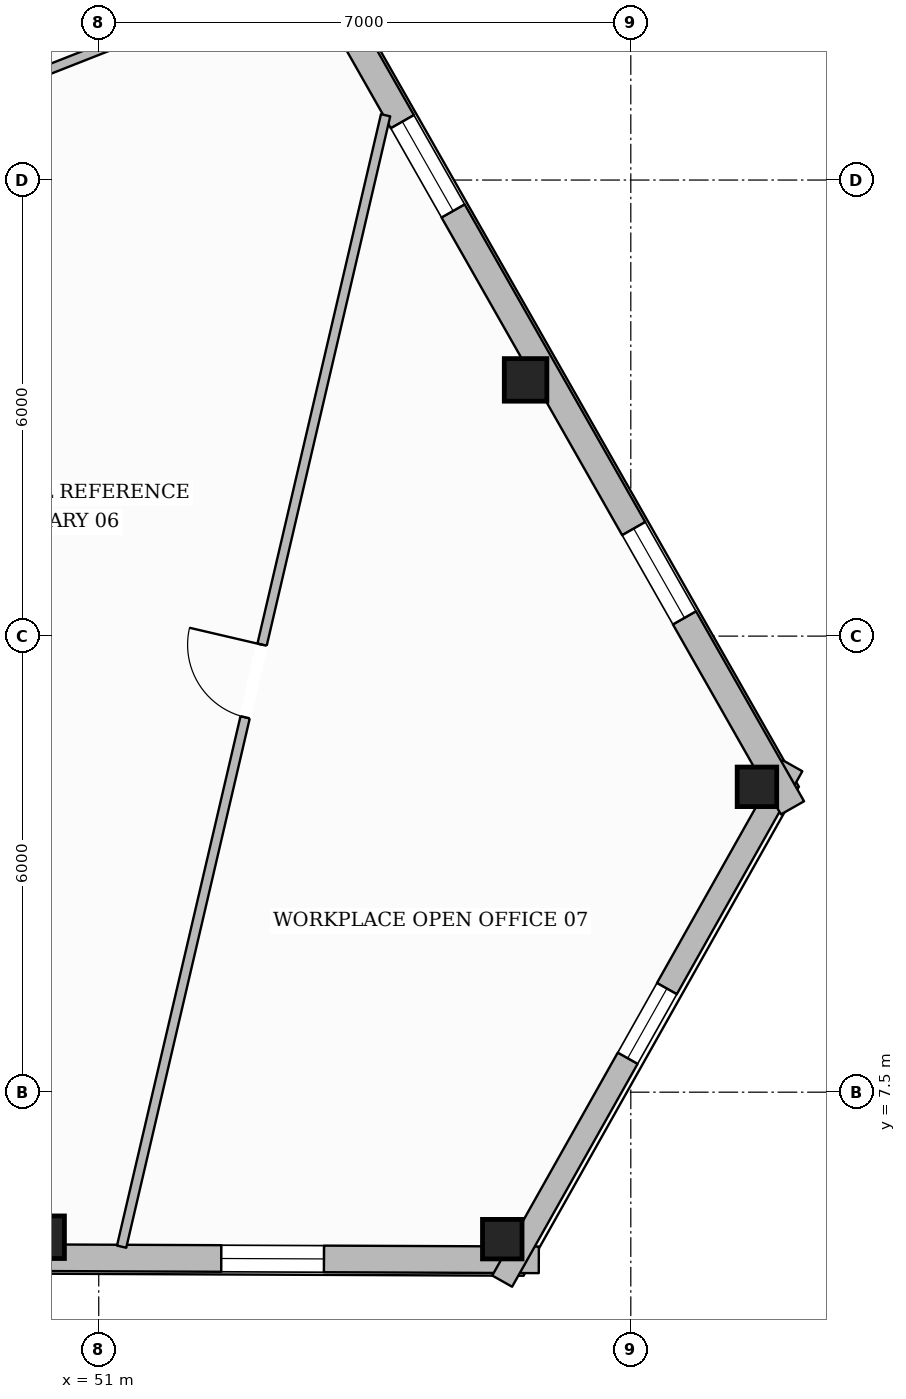
"""IFC4 building model, lengths in metres.
Left out: names, types, materials, properties, quantities, classifications, styles, units other than length and angle.
Written with IfcOpenShell. Run it as: python <this file> out.ifc"""

import sys

from ifc_helpers import new_model, si_unit, direction, frame, frame_2d, origin, origin_2d, place, context, subcontext, project, spatial, rectangle, hollow_rectangle, extrude, element, fill, save


model = new_model("IFC4")
c1 = context("Model", 3, precision=1e-05, world=origin(), true_north=direction((0.0, 1.0)))
c2 = subcontext(c1, "Body", "Model", "MODEL_VIEW")
j1 = project(units=[si_unit("LENGTHUNIT", "METRE"), si_unit("PLANEANGLEUNIT", "RADIAN")], contexts=[c1])
p1 = place(None, origin())
s1 = spatial("IfcSite", under=j1, at=p1, CompositionType="ELEMENT")
p2 = place(p1, origin())
s2 = spatial("IfcBuilding", under=s1, at=p2, CompositionType="ELEMENT")
p3 = place(p2, frame((0.0, 0.0, 239.5)))
s3 = spatial("IfcBuildingStorey", under=s2, at=p3, CompositionType="ELEMENT", Elevation=239.5)
p4 = place(p3, frame((50.269, 5.592, 0.0), z_axis=(0.0, 0.0, 1.0), x_axis=(1.0, 0.0, 0.0)))
e1 = element("IfcColumn", 1, at=p4, inside=s3, PredefinedType="COLUMN", context=c2, shape_type="SweptSolid", body=[
    extrude(hollow_rectangle(XDim=0.56, YDim=0.56, WallThickness=0.025, at=origin_2d()), origin(), (0.0, 0.0, 1.0), 3.61),
])
for number, where, z_axis, x_axis in (
    (2, (56.309, 5.566, 0.0), (0.0, 0.0, 1.0), (1.0, 0.0, 0.0)),
    (3, (59.659, 11.517, 0.0), (0.0, 0.0, 1.0), (1.0, 0.0, 0.0)),
):
    element("IfcColumn", number, at=place(p3, frame(where, z_axis=z_axis, x_axis=x_axis)), inside=s3, PredefinedType="COLUMN", context=c2, shape_type="SweptSolid", body=[
        extrude(hollow_rectangle(XDim=0.52, YDim=0.52, WallThickness=0.024, at=origin_2d()), origin(), (0.0, 0.0, 1.0), 3.61),
    ])
p5 = place(p3, frame((56.615, 16.871, 0.0), z_axis=(0.0, 0.0, 1.0), x_axis=(1.0, 0.0, 0.0)))
e4 = element("IfcColumn", 4, at=p5, inside=s3, PredefinedType="COLUMN", context=c2, shape_type="SweptSolid", body=[
    extrude(hollow_rectangle(XDim=0.56, YDim=0.56, WallThickness=0.025, at=origin_2d()), origin(), (0.0, 0.0, 1.0), 3.61),
])
p6 = place(p3, frame((56.79, 5.294, 0.0), z_axis=(0.0, 0.0, 1.0), x_axis=(-0.999991124913, 0.004213086292, 0.0)))
e5 = element("IfcWall", 5, at=p6, inside=s3, PredefinedType="STANDARD", context=c2, shape_type="SweptSolid", body=[
    extrude(rectangle(XDim=37.203, YDim=0.35, at=frame_2d((18.601, 0.0))), origin(), (0.0, 0.0, 1.0), 3.196),
])
p7 = place(p6, frame((27.302, 0.0, 0.0)))
e6 = element("IfcOpeningElement", 6, at=p7, cuts=e5, PredefinedType="OPENING", context=c2, shape_type="SweptSolid", body=[
    extrude(rectangle(XDim=1.0, YDim=2.2, at=frame_2d((0.5, 1.1))), frame((0.0, 0.185, 0.0), z_axis=(0.0, -1.0, 0.0), x_axis=(1.0, 0.0, 0.0)), (0.0, 0.0, 1.0), 0.37),
])
p8 = place(p6, frame((33.03, 0.0, 0.65)))
e7 = element("IfcOpeningElement", 7, at=p8, cuts=e5, PredefinedType="OPENING", context=c2, shape_type="SweptSolid", body=[
    extrude(rectangle(XDim=1.35, YDim=1.75, at=frame_2d((0.675, 0.875))), frame((0.0, 0.185, 0.0), z_axis=(0.0, -1.0, 0.0), x_axis=(1.0, 0.0, 0.0)), (0.0, 0.0, 1.0), 0.37),
])
p9 = place(p6, frame((20.948, 0.0, 0.65)))
e8 = element("IfcOpeningElement", 8, at=p9, cuts=e5, PredefinedType="OPENING", context=c2, shape_type="SweptSolid", body=[
    extrude(rectangle(XDim=1.35, YDim=1.75, at=frame_2d((0.675, 0.875))), frame((0.0, 0.185, 0.0), z_axis=(0.0, -1.0, 0.0), x_axis=(1.0, 0.0, 0.0)), (0.0, 0.0, 1.0), 0.37),
])
p10 = place(p6, frame((8.868, 0.0, 0.65)))
e9 = element("IfcOpeningElement", 9, at=p10, cuts=e5, PredefinedType="OPENING", context=c2, shape_type="SweptSolid", body=[
    extrude(rectangle(XDim=1.35, YDim=1.75, at=frame_2d((0.675, 0.875))), frame((0.0, 0.185, 0.0), z_axis=(0.0, -1.0, 0.0), x_axis=(1.0, 0.0, 0.0)), (0.0, 0.0, 1.0), 0.37),
])
p11 = place(p6, frame((2.827, 0.0, 0.65)))
e10 = element("IfcOpeningElement", 10, at=p11, cuts=e5, PredefinedType="OPENING", context=c2, shape_type="SweptSolid", body=[
    extrude(rectangle(XDim=1.35, YDim=1.75, at=frame_2d((0.675, 0.875))), frame((0.0, 0.185, 0.0), z_axis=(0.0, -1.0, 0.0), x_axis=(1.0, 0.0, 0.0)), (0.0, 0.0, 1.0), 0.37),
])
p12 = place(p3, frame((60.126, 11.796, 0.0), z_axis=(0.0, 0.0, 1.0), x_axis=(-0.490626070129, -0.87137021943, 0.0)))
e11 = element("IfcWall", 11, at=p12, inside=s3, PredefinedType="STANDARD", context=c2, shape_type="SweptSolid", body=[
    extrude(rectangle(XDim=7.783, YDim=0.3, at=frame_2d((3.892, 0.0))), origin(), (0.0, 0.0, 1.0), 3.196),
])
p13 = place(p12, frame((3.366, 0.0, 0.65)))
e12 = element("IfcOpeningElement", 12, at=p13, cuts=e11, PredefinedType="OPENING", context=c2, shape_type="SweptSolid", body=[
    extrude(rectangle(XDim=1.05, YDim=1.7, at=frame_2d((0.525, 0.85))), frame((0.0, 0.16, 0.0), z_axis=(0.0, -1.0, 0.0), x_axis=(1.0, 0.0, 0.0)), (0.0, 0.0, 1.0), 0.32),
])
p14 = place(p3, frame((41.394, 44.187, 0.0), z_axis=(0.0, 0.0, 1.0), x_axis=(0.494287620829, -0.869298422807, 0.0)))
e13 = element("IfcWall", 13, at=p14, inside=s3, PredefinedType="STANDARD", context=c2, shape_type="SweptSolid", body=[
    extrude(rectangle(XDim=37.899, YDim=0.35, at=frame_2d((18.95, 0.0))), origin(), (0.0, 0.0, 1.0), 3.196),
])
p15 = place(p14, frame((33.674, 0.0, 0.65)))
e14 = element("IfcOpeningElement", 14, at=p15, cuts=e13, PredefinedType="OPENING", context=c2, shape_type="SweptSolid", body=[
    extrude(rectangle(XDim=1.35, YDim=1.75, at=frame_2d((0.675, 0.875))), frame((0.0, 0.185, 0.0), z_axis=(0.0, -1.0, 0.0), x_axis=(1.0, 0.0, 0.0)), (0.0, 0.0, 1.0), 0.37),
])
p16 = place(p14, frame((27.515, 0.0, 0.65)))
e15 = element("IfcOpeningElement", 15, at=p16, cuts=e13, PredefinedType="OPENING", context=c2, shape_type="SweptSolid", body=[
    extrude(rectangle(XDim=1.35, YDim=1.75, at=frame_2d((0.675, 0.875))), frame((0.0, 0.185, 0.0), z_axis=(0.0, -1.0, 0.0), x_axis=(1.0, 0.0, 0.0)), (0.0, 0.0, 1.0), 0.37),
])
p17 = place(p14, frame((21.357, 0.0, 0.65)))
e16 = element("IfcOpeningElement", 16, at=p17, cuts=e13, PredefinedType="OPENING", context=c2, shape_type="SweptSolid", body=[
    extrude(rectangle(XDim=1.35, YDim=1.75, at=frame_2d((0.675, 0.875))), frame((0.0, 0.185, 0.0), z_axis=(0.0, -1.0, 0.0), x_axis=(1.0, 0.0, 0.0)), (0.0, 0.0, 1.0), 0.37),
])
p18 = place(p14, frame((9.04, 0.0, 0.65)))
e17 = element("IfcOpeningElement", 17, at=p18, cuts=e13, PredefinedType="OPENING", context=c2, shape_type="SweptSolid", body=[
    extrude(rectangle(XDim=1.35, YDim=1.75, at=frame_2d((0.675, 0.875))), frame((0.0, 0.185, 0.0), z_axis=(0.0, -1.0, 0.0), x_axis=(1.0, 0.0, 0.0)), (0.0, 0.0, 1.0), 0.37),
])
p19 = place(p14, frame((2.882, 0.0, 0.65)))
e18 = element("IfcOpeningElement", 18, at=p19, cuts=e13, PredefinedType="OPENING", context=c2, shape_type="SweptSolid", body=[
    extrude(rectangle(XDim=1.35, YDim=1.75, at=frame_2d((0.675, 0.875))), frame((0.0, 0.185, 0.0), z_axis=(0.0, -1.0, 0.0), x_axis=(1.0, 0.0, 0.0)), (0.0, 0.0, 1.0), 0.37),
])
p20 = place(p3, frame((49.99, 20.816, 0.0), z_axis=(0.0, 0.0, 1.0), x_axis=(0.930607179135, 0.366019505139, 0.0)))
e19 = element("IfcWall", 19, at=p20, inside=s3, PredefinedType="PARTITIONING", context=c2, shape_type="SweptSolid", body=[
    extrude(rectangle(XDim=3.539, YDim=0.125, at=frame_2d((1.769, 0.0))), origin(), (0.0, 0.0, 1.0), 3.61),
])
p21 = place(p3, frame((51.301, 5.468, 0.0), z_axis=(0.0, 0.0, 1.0), x_axis=(0.22721648706, 0.973844272976, 0.0)))
e20 = element("IfcWall", 20, at=p21, inside=s3, PredefinedType="PARTITIONING", context=c2, shape_type="SweptSolid", body=[
    extrude(rectangle(XDim=15.284, YDim=0.125, at=frame_2d((7.642, 0.0))), origin(), (0.0, 0.0, 1.0), 3.349),
])
p22 = place(p21, frame((7.152, 0.0, 0.0)))
e21 = element("IfcOpeningElement", 21, at=p22, cuts=e20, PredefinedType="OPENING", context=c2, shape_type="SweptSolid", body=[
    extrude(rectangle(XDim=0.98, YDim=2.15, at=frame_2d((0.49, 1.075))), frame((0.0, 0.073, 0.0), z_axis=(0.0, -1.0, 0.0), x_axis=(1.0, 0.0, 0.0)), (0.0, 0.0, 1.0), 0.145),
])
p23 = place(p11, origin())
e22 = element("IfcWindow", 22, at=p23, inside=s3, PartitioningType="SINGLE_PANEL", PredefinedType="WINDOW", context=c2, shape_type="SweptSolid", body=[
    extrude(rectangle(XDim=1.35, YDim=1.75, at=frame_2d((0.675, 0.875))), frame((0.0, 0.03, 0.0), z_axis=(0.0, -1.0, 0.0), x_axis=(1.0, 0.0, 0.0)), (0.0, 0.0, 1.0), 0.06),
])
fill(e10, e22)
p24 = place(p15, origin())
e23 = element("IfcWindow", 23, at=p24, inside=s3, PartitioningType="SINGLE_PANEL", PredefinedType="WINDOW", context=c2, shape_type="SweptSolid", body=[
    extrude(rectangle(XDim=1.35, YDim=1.75, at=frame_2d((0.675, 0.875))), frame((0.0, 0.03, 0.0), z_axis=(0.0, -1.0, 0.0), x_axis=(1.0, 0.0, 0.0)), (0.0, 0.0, 1.0), 0.06),
])
fill(e14, e23)
p25 = place(p16, origin())
e24 = element("IfcWindow", 24, at=p25, inside=s3, PartitioningType="SINGLE_PANEL", PredefinedType="WINDOW", context=c2, shape_type="SweptSolid", body=[
    extrude(rectangle(XDim=1.35, YDim=1.75, at=frame_2d((0.675, 0.875))), frame((0.0, 0.03, 0.0), z_axis=(0.0, -1.0, 0.0), x_axis=(1.0, 0.0, 0.0)), (0.0, 0.0, 1.0), 0.06),
])
fill(e15, e24)
p26 = place(p13, origin())
e25 = element("IfcWindow", 25, at=p26, inside=s3, PartitioningType="SINGLE_PANEL", PredefinedType="WINDOW", context=c2, shape_type="SweptSolid", body=[
    extrude(rectangle(XDim=1.05, YDim=1.7, at=frame_2d((0.525, 0.85))), frame((0.0, 0.03, 0.0), z_axis=(0.0, -1.0, 0.0), x_axis=(1.0, 0.0, 0.0)), (0.0, 0.0, 1.0), 0.06),
])
fill(e12, e25)
p27 = place(p22, origin())
e26 = element("IfcDoor", 26, at=p27, inside=s3, OperationType="SINGLE_SWING_RIGHT", PredefinedType="DOOR", context=c2, shape_type="SweptSolid", body=[
    extrude(rectangle(XDim=0.98, YDim=2.15, at=frame_2d((0.49, 1.075))), frame((0.0, 0.025, 0.0), z_axis=(0.0, -1.0, 0.0), x_axis=(1.0, 0.0, 0.0)), (0.0, 0.0, 1.0), 0.05),
])
fill(e21, e26)
save(model, sys.argv[1])
